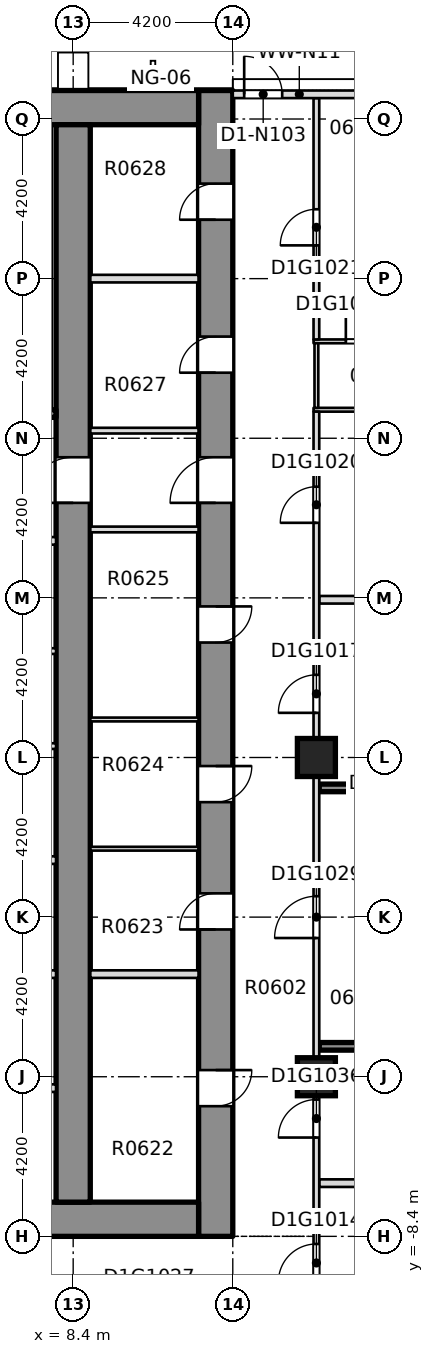
"""IFC4 building model, lengths in metres.
Left out: names, types, materials, properties, quantities, classifications, styles, units other than length and angle.
Written with IfcOpenShell. Run it as: python <this file> out.ifc"""

import sys

from ifc_helpers import new_model, si_unit, direction, frame, frame_2d, origin, origin_2d, place, context, subcontext, project, spatial, rectangle, extrude, element, fill, save


model = new_model("IFC4")
c1 = context("Model", 3, precision=1e-05, world=origin(), true_north=direction((0.0, 1.0)))
c2 = subcontext(c1, "Body", "Model", "MODEL_VIEW")
j1 = project(units=[si_unit("LENGTHUNIT", "METRE"), si_unit("PLANEANGLEUNIT", "RADIAN")], contexts=[c1])
p1 = place(None, origin())
s1 = spatial("IfcSite", under=j1, at=p1, CompositionType="ELEMENT")
p2 = place(p1, origin())
s2 = spatial("IfcBuilding", under=s1, at=p2, CompositionType="ELEMENT")
p3 = place(p2, frame((0.0, 0.0, 34.5)))
s3 = spatial("IfcBuildingStorey", under=s2, at=p3, CompositionType="ELEMENT", Elevation=34.5)
p4 = place(p3, frame((12.15, -8.4, -0.32), z_axis=(0.0, 0.0, 1.0), x_axis=(0.0, 1.0, 0.0)))
e1 = element("IfcWall", 1, at=p4, inside=s3, PredefinedType="SHEAR", context=c2, shape_type="SweptSolid", body=[
    extrude(rectangle(XDim=30.15, YDim=0.9, at=frame_2d((15.075, 0.0))), origin(), (0.0, 0.0, 1.0), 3.45),
])
p5 = place(p4, frame((3.425, 0.0, 0.32)))
e2 = element("IfcOpeningElement", 2, at=p5, cuts=e1, PredefinedType="OPENING", context=c2, shape_type="SweptSolid", body=[
    extrude(rectangle(XDim=0.95, YDim=2.1, at=frame_2d((0.475, 1.05))), frame((0.0, 0.46, 0.0), z_axis=(0.0, -1.0, 0.0), x_axis=(1.0, 0.0, 0.0)), (0.0, 0.0, 1.0), 0.92),
])
p6 = place(p4, frame((8.075, 0.0, 0.32)))
e3 = element("IfcOpeningElement", 3, at=p6, cuts=e1, PredefinedType="OPENING", context=c2, shape_type="SweptSolid", body=[
    extrude(rectangle(XDim=0.95, YDim=2.1, at=frame_2d((0.475, 1.05))), frame((0.0, 0.46, 0.0), z_axis=(0.0, -1.0, 0.0), x_axis=(1.0, 0.0, 0.0)), (0.0, 0.0, 1.0), 0.92),
])
p7 = place(p4, frame((11.425, 0.0, 0.32)))
e4 = element("IfcOpeningElement", 4, at=p7, cuts=e1, PredefinedType="OPENING", context=c2, shape_type="SweptSolid", body=[
    extrude(rectangle(XDim=0.95, YDim=2.1, at=frame_2d((0.475, 1.05))), frame((0.0, 0.46, 0.0), z_axis=(0.0, -1.0, 0.0), x_axis=(1.0, 0.0, 0.0)), (0.0, 0.0, 1.0), 0.92),
])
p8 = place(p4, frame((15.625, 0.0, 0.32)))
e5 = element("IfcOpeningElement", 5, at=p8, cuts=e1, PredefinedType="OPENING", context=c2, shape_type="SweptSolid", body=[
    extrude(rectangle(XDim=0.95, YDim=2.1, at=frame_2d((0.475, 1.05))), frame((0.0, 0.46, 0.0), z_axis=(0.0, -1.0, 0.0), x_axis=(1.0, 0.0, 0.0)), (0.0, 0.0, 1.0), 0.92),
])
p9 = place(p4, frame((22.725, 0.0, 0.32)))
e6 = element("IfcOpeningElement", 6, at=p9, cuts=e1, PredefinedType="OPENING", context=c2, shape_type="SweptSolid", body=[
    extrude(rectangle(XDim=0.95, YDim=2.1, at=frame_2d((0.475, 1.05))), frame((0.0, 0.46, 0.0), z_axis=(0.0, -1.0, 0.0), x_axis=(1.0, 0.0, 0.0)), (0.0, 0.0, 1.0), 0.92),
])
p10 = place(p4, frame((26.75, 0.0, 0.32)))
e7 = element("IfcOpeningElement", 7, at=p10, cuts=e1, PredefinedType="OPENING", context=c2, shape_type="SweptSolid", body=[
    extrude(rectangle(XDim=0.95, YDim=2.1, at=frame_2d((0.475, 1.05))), frame((0.0, 0.46, 0.0), z_axis=(0.0, -1.0, 0.0), x_axis=(1.0, 0.0, 0.0)), (0.0, 0.0, 1.0), 0.92),
])
p11 = place(p4, frame((19.3, 0.0, 0.32)))
e8 = element("IfcOpeningElement", 8, at=p11, cuts=e1, PredefinedType="OPENING", context=c2, shape_type="SweptSolid", body=[
    extrude(rectangle(XDim=1.2, YDim=2.1, at=frame_2d((0.6, 1.05))), frame((0.0, 0.46, 0.0), z_axis=(0.0, -1.0, 0.0), x_axis=(1.0, 0.0, 0.0)), (0.0, 0.0, 1.0), 0.92),
])
p12 = place(p3, frame((-11.7, -7.95, -0.32), z_axis=(0.0, 0.0, 1.0), x_axis=(1.0, 0.0, 0.0)))
e9 = element("IfcWall", 9, at=p12, inside=s3, PredefinedType="SHEAR", context=c2, shape_type="SweptSolid", body=[
    extrude(rectangle(XDim=23.4, YDim=0.9, at=frame_2d((11.7, 0.0))), origin(), (0.0, 0.0, 1.0), 3.45),
])
p13 = place(p12, frame((6.95, 0.0, 0.32)))
e10 = element("IfcOpeningElement", 10, at=p13, cuts=e9, PredefinedType="OPENING", context=c2, shape_type="SweptSolid", body=[
    extrude(rectangle(XDim=1.8, YDim=2.1, at=frame_2d((0.9, 1.05))), frame((0.0, 0.46, 0.0), z_axis=(0.0, -1.0, 0.0), x_axis=(1.0, 0.0, 0.0)), (0.0, 0.0, 1.0), 0.92),
])
p14 = place(p12, frame((14.65, 0.0, 0.32)))
e11 = element("IfcOpeningElement", 11, at=p14, cuts=e9, PredefinedType="OPENING", context=c2, shape_type="SweptSolid", body=[
    extrude(rectangle(XDim=1.8, YDim=2.1, at=frame_2d((0.9, 1.05))), frame((0.0, 0.46, 0.0), z_axis=(0.0, -1.0, 0.0), x_axis=(1.0, 0.0, 0.0)), (0.0, 0.0, 1.0), 0.92),
])
p15 = place(p3, frame((-11.7, 21.3, -0.32), z_axis=(0.0, 0.0, 1.0), x_axis=(1.0, 0.0, 0.0)))
e12 = element("IfcWall", 12, at=p15, inside=s3, PredefinedType="SOLIDWALL", context=c2, shape_type="SweptSolid", body=[
    extrude(rectangle(XDim=23.4, YDim=0.9, at=frame_2d((11.7, 0.0))), origin(), (0.0, 0.0, 1.0), 3.45),
])
p16 = place(p3, frame((8.4, -7.5, -0.32), z_axis=(0.0, 0.0, 1.0), x_axis=(0.0, 1.0, 0.0)))
e13 = element("IfcWall", 13, at=p16, inside=s3, PredefinedType="SHEAR", context=c2, shape_type="SweptSolid", body=[
    extrude(rectangle(XDim=28.35, YDim=0.9, at=frame_2d((14.175, 0.0))), origin(), (0.0, 0.0, 1.0), 3.45),
])
p17 = place(p16, frame((18.4, 0.0, 0.32)))
e14 = element("IfcOpeningElement", 14, at=p17, cuts=e13, PredefinedType="OPENING", context=c2, shape_type="SweptSolid", body=[
    extrude(rectangle(XDim=1.2, YDim=2.1, at=frame_2d((0.6, 1.05))), frame((0.0, 0.46, 0.0), z_axis=(0.0, -1.0, 0.0), x_axis=(1.0, 0.0, 0.0)), (0.0, 0.0, 1.0), 0.92),
])
for number, where, z_axis, x_axis in (
    (15, (14.8, -4.2, -0.32), (0.0, 0.0, 1.0), (1.0, 0.0, 0.0)),
    (16, (14.8, 4.2, -0.32), (0.0, 0.0, 1.0), (1.0, 0.0, 0.0)),
):
    element("IfcColumn", number, at=place(p3, frame(where, z_axis=z_axis, x_axis=x_axis)), inside=s3, PredefinedType="COLUMN", context=c2, shape_type="SweptSolid", body=[
        extrude(rectangle(XDim=1.0, YDim=1.0, at=origin_2d()), origin(), (0.0, 0.0, 1.0), 3.45),
    ])
p18 = place(p3, frame((14.875, -7.0, 0.0), z_axis=(0.0, 0.0, 1.0), x_axis=(1.0, 0.0, 0.0)))
e17 = element("IfcWall", 17, at=p18, inside=s3, PredefinedType="PARTITIONING", context=c2, shape_type="SweptSolid", body=[
    extrude(rectangle(XDim=10.875, YDim=0.2, at=frame_2d((5.438, 0.0))), origin(), (0.0, 0.0, 1.0), 3.13),
])
p19 = place(p3, frame((14.875, -3.4, 0.0), z_axis=(0.0, 0.0, 1.0), x_axis=(1.0, 0.0, 0.0)))
e18 = element("IfcWall", 18, at=p19, inside=s3, PredefinedType="SOLIDWALL", context=c2, shape_type="SweptSolid", body=[
    extrude(rectangle(XDim=5.525, YDim=0.2, at=frame_2d((2.762, 0.0))), origin(), (0.0, 0.0, 1.0), 3.13),
])
p20 = place(p3, frame((14.875, 3.4, 0.0), z_axis=(0.0, 0.0, 1.0), x_axis=(1.0, 0.0, 0.0)))
e19 = element("IfcWall", 19, at=p20, inside=s3, PredefinedType="SOLIDWALL", context=c2, shape_type="SweptSolid", body=[
    extrude(rectangle(XDim=5.575, YDim=0.2, at=frame_2d((2.788, 0.0))), origin(), (0.0, 0.0, 1.0), 3.13),
])
p21 = place(p3, frame((14.875, 8.35, 0.0), z_axis=(0.0, 0.0, 1.0), x_axis=(1.0, 0.0, 0.0)))
e20 = element("IfcWall", 20, at=p21, inside=s3, PredefinedType="PARTITIONING", context=c2, shape_type="SweptSolid", body=[
    extrude(rectangle(XDim=10.875, YDim=0.2, at=frame_2d((5.438, 0.0))), origin(), (0.0, 0.0, 1.0), 3.13),
])
p22 = place(p3, frame((14.725, 13.35, 0.0), z_axis=(0.0, 0.0, 1.0), x_axis=(1.0, 0.0, 0.0)))
e21 = element("IfcWall", 21, at=p22, inside=s3, PredefinedType="PARTITIONING", context=c2, shape_type="SweptSolid", body=[
    extrude(rectangle(XDim=2.525, YDim=0.1, at=frame_2d((1.262, 0.0))), origin(), (0.0, 0.0, 1.0), 3.13),
])
p23 = place(p3, frame((14.725, 15.15, 0.0), z_axis=(0.0, 0.0, 1.0), x_axis=(1.0, 0.0, 0.0)))
e22 = element("IfcWall", 22, at=p23, inside=s3, PredefinedType="PARTITIONING", context=c2, shape_type="SweptSolid", body=[
    extrude(rectangle(XDim=2.525, YDim=0.1, at=frame_2d((1.262, 0.0))), origin(), (0.0, 0.0, 1.0), 3.13),
])
p24 = place(p23, frame((0.85, 0.0, 0.0)))
e23 = element("IfcOpeningElement", 23, at=p24, cuts=e22, PredefinedType="OPENING", context=c2, shape_type="SweptSolid", body=[
    extrude(rectangle(XDim=0.85, YDim=2.1, at=frame_2d((0.425, 1.05))), frame((0.0, 0.06, 0.0), z_axis=(0.0, -1.0, 0.0), x_axis=(1.0, 0.0, 0.0)), (0.0, 0.0, 1.0), 0.12),
])
p25 = place(p3, frame((14.8, -10.525, 0.0), z_axis=(0.0, 0.0, 1.0), x_axis=(0.0, 1.0, 0.0)))
e24 = element("IfcWall", 24, at=p25, inside=s3, PredefinedType="PARTITIONING", context=c2, shape_type="SweptSolid", body=[
    extrude(rectangle(XDim=23.825, YDim=0.15, at=frame_2d((11.913, 0.0))), origin(), (0.0, 0.0, 1.0), 3.13),
])
p26 = place(p25, frame((0.925, 0.0, 0.0)))
e25 = element("IfcOpeningElement", 25, at=p26, cuts=e24, PredefinedType="OPENING", context=c2, shape_type="SweptSolid", body=[
    extrude(rectangle(XDim=1.0, YDim=2.1, at=frame_2d((0.5, 1.05))), frame((0.0, 0.085, 0.0), z_axis=(0.0, -1.0, 0.0), x_axis=(1.0, 0.0, 0.0)), (0.0, 0.0, 1.0), 0.17),
])
p27 = place(p25, frame((15.9, 0.0, 0.0)))
e26 = element("IfcOpeningElement", 26, at=p27, cuts=e24, PredefinedType="OPENING", context=c2, shape_type="SweptSolid", body=[
    extrude(rectangle(XDim=1.0, YDim=2.1, at=frame_2d((0.5, 1.05))), frame((0.0, 0.085, 0.0), z_axis=(0.0, -1.0, 0.0), x_axis=(1.0, 0.0, 0.0)), (0.0, 0.0, 1.0), 0.17),
])
p28 = place(p25, frame((20.9, 0.0, 0.0)))
e27 = element("IfcOpeningElement", 27, at=p28, cuts=e24, PredefinedType="OPENING", context=c2, shape_type="SweptSolid", body=[
    extrude(rectangle(XDim=0.95, YDim=2.1, at=frame_2d((0.475, 1.05))), frame((0.0, 0.085, 0.0), z_axis=(0.0, -1.0, 0.0), x_axis=(1.0, 0.0, 0.0)), (0.0, 0.0, 1.0), 0.17),
])
p29 = place(p25, frame((9.975, 0.0, 0.0)))
e28 = element("IfcOpeningElement", 28, at=p29, cuts=e24, PredefinedType="OPENING", context=c2, shape_type="SweptSolid", body=[
    extrude(rectangle(XDim=1.1, YDim=2.1, at=frame_2d((0.55, 1.05))), frame((0.0, 0.085, 0.0), z_axis=(0.0, -1.0, 0.0), x_axis=(1.0, 0.0, 0.0)), (0.0, 0.0, 1.0), 0.17),
])
p30 = place(p25, frame((4.725, 0.0, 0.0)))
e29 = element("IfcOpeningElement", 29, at=p30, cuts=e24, PredefinedType="OPENING", context=c2, shape_type="SweptSolid", body=[
    extrude(rectangle(XDim=1.0, YDim=2.1, at=frame_2d((0.5, 1.05))), frame((0.0, 0.085, 0.0), z_axis=(0.0, -1.0, 0.0), x_axis=(1.0, 0.0, 0.0)), (0.0, 0.0, 1.0), 0.17),
])
p31 = place(p3, frame((14.8, 13.4, 0.0), z_axis=(0.0, 0.0, 1.0), x_axis=(0.0, 1.0, 0.0)))
e30 = element("IfcWall", 30, at=p31, inside=s3, PredefinedType="PARTITIONING", context=c2, shape_type="SweptSolid", body=[
    extrude(rectangle(XDim=1.7, YDim=0.1, at=frame_2d((0.85, 0.0))), origin(), (0.0, 0.0, 1.0), 3.13),
])
p32 = place(p3, frame((14.8, 15.2, 0.0), z_axis=(0.0, 0.0, 1.0), x_axis=(0.0, 1.0, 0.0)))
e31 = element("IfcWall", 31, at=p32, inside=s3, PredefinedType="PARTITIONING", context=c2, shape_type="SweptSolid", body=[
    extrude(rectangle(XDim=6.35, YDim=0.15, at=frame_2d((3.175, 0.0))), origin(), (0.0, 0.0, 1.0), 3.13),
])
p33 = place(p32, frame((2.475, 0.0, 0.0)))
e32 = element("IfcOpeningElement", 32, at=p33, cuts=e31, PredefinedType="OPENING", context=c2, shape_type="SweptSolid", body=[
    extrude(rectangle(XDim=0.95, YDim=2.1, at=frame_2d((0.475, 1.05))), frame((0.0, 0.085, 0.0), z_axis=(0.0, -1.0, 0.0), x_axis=(1.0, 0.0, 0.0)), (0.0, 0.0, 1.0), 0.17),
])
p34 = place(p3, frame((16.1, 21.65, 0.0), z_axis=(0.0, 0.0, 1.0), x_axis=(-1.0, 0.0, 0.0)))
e33 = element("IfcWall", 33, at=p34, inside=s3, PredefinedType="STANDARD", context=c2, shape_type="SweptSolid", body=[
    extrude(rectangle(XDim=3.5, YDim=0.2, at=frame_2d((1.75, 0.0))), origin(), (0.0, 0.0, 1.0), 3.13),
])
p35 = place(p34, frame((2.2, 0.0, 0.0)))
e34 = element("IfcOpeningElement", 34, at=p35, cuts=e33, PredefinedType="OPENING", context=c2, shape_type="SweptSolid", body=[
    extrude(rectangle(XDim=1.0, YDim=2.4, at=frame_2d((0.5, 1.2))), frame((0.0, 0.11, 0.0), z_axis=(0.0, -1.0, 0.0), x_axis=(1.0, 0.0, 0.0)), (0.0, 0.0, 1.0), 0.22),
])
for number, where, z_axis, x_axis in (
    (35, (5.575, -4.5, 0.0), (0.0, 0.0, 1.0), (1.0, 0.0, 0.0)),
    (36, (5.575, -1.5, 0.0), (0.0, 0.0, 1.0), (1.0, 0.0, 0.0)),
    (37, (5.575, 1.5, 0.0), (0.0, 0.0, 1.0), (1.0, 0.0, 0.0)),
):
    element("IfcWall", number, at=place(p3, frame(where, z_axis=z_axis, x_axis=x_axis)), inside=s3, PredefinedType="PARTITIONING", context=c2, shape_type="SweptSolid", body=[
        extrude(rectangle(XDim=2.374, YDim=0.2, at=frame_2d((1.187, 0.0))), origin(), (0.0, 0.0, 1.0), 3.13),
    ])
p36 = place(p3, frame((5.425, 4.5, 0.0), z_axis=(0.0, 0.0, 1.0), x_axis=(1.0, 0.0, 0.0)))
e38 = element("IfcWall", 38, at=p36, inside=s3, PredefinedType="PARTITIONING", context=c2, shape_type="SweptSolid", body=[
    extrude(rectangle(XDim=2.524, YDim=0.15, at=frame_2d((1.262, 0.0))), origin(), (0.0, 0.0, 1.0), 3.13),
])
p37 = place(p3, frame((-7.949, 7.0, 0.0), z_axis=(0.0, 0.0, 1.0), x_axis=(1.0, 0.0, 0.0)))
e39 = element("IfcWall", 39, at=p37, inside=s3, PredefinedType="PARTITIONING", context=c2, shape_type="SweptSolid", body=[
    extrude(rectangle(XDim=15.898, YDim=0.15, at=frame_2d((7.949, 0.0))), origin(), (0.0, 0.0, 1.0), 3.13),
])
p38 = place(p37, frame((7.249, 0.0, 0.0)))
e40 = element("IfcOpeningElement", 40, at=p38, cuts=e39, PredefinedType="OPENING", context=c2, shape_type="SweptSolid", body=[
    extrude(rectangle(XDim=1.4, YDim=2.1, at=frame_2d((0.7, 1.05))), frame((0.0, 0.085, 0.0), z_axis=(0.0, -1.0, 0.0), x_axis=(1.0, 0.0, 0.0)), (0.0, 0.0, 1.0), 0.17),
])
p39 = place(p3, frame((3.6, 9.9, 0.0), z_axis=(0.0, 0.0, 1.0), x_axis=(1.0, 0.0, 0.0)))
e41 = element("IfcWall", 41, at=p39, inside=s3, PredefinedType="PARTITIONING", context=c2, shape_type="SweptSolid", body=[
    extrude(rectangle(XDim=4.349, YDim=0.2, at=frame_2d((2.174, 0.0))), origin(), (0.0, 0.0, 1.0), 3.13),
])
p40 = place(p39, frame((2.25, 0.0, 0.0)))
e42 = element("IfcOpeningElement", 42, at=p40, cuts=e41, PredefinedType="OPENING", context=c2, shape_type="SweptSolid", body=[
    extrude(rectangle(XDim=1.1, YDim=2.1, at=frame_2d((0.55, 1.05))), frame((0.0, 0.11, 0.0), z_axis=(0.0, -1.0, 0.0), x_axis=(1.0, 0.0, 0.0)), (0.0, 0.0, 1.0), 0.22),
])
p41 = place(p3, frame((3.425, 13.25, 0.0), z_axis=(0.0, 0.0, 1.0), x_axis=(1.0, 0.0, 0.0)))
e43 = element("IfcWall", 43, at=p41, inside=s3, PredefinedType="SOLIDWALL", context=c2, shape_type="SweptSolid", body=[
    extrude(rectangle(XDim=4.524, YDim=0.2, at=frame_2d((2.262, 0.0))), origin(), (0.0, 0.0, 1.0), 3.13),
])
p42 = place(p41, frame((1.825, 0.0, 0.0)))
e44 = element("IfcOpeningElement", 44, at=p42, cuts=e43, PredefinedType="OPENING", context=c2, shape_type="SweptSolid", body=[
    extrude(rectangle(XDim=1.2, YDim=2.1, at=frame_2d((0.6, 1.05))), frame((0.0, 0.11, 0.0), z_axis=(0.0, -1.0, 0.0), x_axis=(1.0, 0.0, 0.0)), (0.0, 0.0, 1.0), 0.22),
])
p43 = place(p3, frame((8.851, -1.5, 0.0), z_axis=(0.0, 0.0, 1.0), x_axis=(1.0, 0.0, 0.0)))
e45 = element("IfcWall", 45, at=p43, inside=s3, PredefinedType="PARTITIONING", context=c2, shape_type="SweptSolid", body=[
    extrude(rectangle(XDim=2.848, YDim=0.2, at=frame_2d((1.424, 0.0))), origin(), (0.0, 0.0, 1.0), 3.13),
])
for number, where, z_axis, x_axis in (
    (46, (8.851, 1.8, 0.0), (0.0, 0.0, 1.0), (1.0, 0.0, 0.0)),
    (47, (8.851, 5.2, 0.0), (0.0, 0.0, 1.0), (1.0, 0.0, 0.0)),
):
    element("IfcWall", number, at=place(p3, frame(where, z_axis=z_axis, x_axis=x_axis)), inside=s3, PredefinedType="PARTITIONING", context=c2, shape_type="SweptSolid", body=[
        extrude(rectangle(XDim=2.848, YDim=0.1, at=frame_2d((1.424, 0.0))), origin(), (0.0, 0.0, 1.0), 3.13),
    ])
for number, where, z_axis, x_axis in (
    (48, (8.851, 10.2, 0.0), (0.0, 0.0, 1.0), (1.0, 0.0, 0.0)),
    (49, (8.851, 12.8, 0.0), (0.0, 0.0, 1.0), (1.0, 0.0, 0.0)),
):
    element("IfcWall", number, at=place(p3, frame(where, z_axis=z_axis, x_axis=x_axis)), inside=s3, PredefinedType="PARTITIONING", context=c2, shape_type="SweptSolid", body=[
        extrude(rectangle(XDim=2.848, YDim=0.15, at=frame_2d((1.424, 0.0))), origin(), (0.0, 0.0, 1.0), 3.13),
    ])
p44 = place(p3, frame((8.851, 16.8, 0.0), z_axis=(0.0, 0.0, 1.0), x_axis=(1.0, 0.0, 0.0)))
e50 = element("IfcWall", 50, at=p44, inside=s3, PredefinedType="PARTITIONING", context=c2, shape_type="SweptSolid", body=[
    extrude(rectangle(XDim=2.848, YDim=0.2, at=frame_2d((1.424, 0.0))), origin(), (0.0, 0.0, 1.0), 3.13),
])
p45 = place(p26, origin())
e51 = element("IfcDoor", 51, at=p45, inside=s3, OperationType="SINGLE_SWING_RIGHT", PredefinedType="DOOR", context=c2, shape_type="SweptSolid", body=[
    extrude(rectangle(XDim=1.0, YDim=2.1, at=frame_2d((0.5, 1.05))), frame((0.0, 0.025, 0.0), z_axis=(0.0, -1.0, 0.0), x_axis=(1.0, 0.0, 0.0)), (0.0, 0.0, 1.0), 0.05),
])
fill(e25, e51)
p46 = place(p27, origin())
e52 = element("IfcDoor", 52, at=p46, inside=s3, OperationType="SINGLE_SWING_LEFT", PredefinedType="DOOR", context=c2, shape_type="SweptSolid", body=[
    extrude(rectangle(XDim=1.0, YDim=2.1, at=frame_2d((0.5, 1.05))), frame((0.0, 0.025, 0.0), z_axis=(0.0, -1.0, 0.0), x_axis=(1.0, 0.0, 0.0)), (0.0, 0.0, 1.0), 0.05),
])
fill(e26, e52)
p47 = place(p28, origin())
e53 = element("IfcDoor", 53, at=p47, inside=s3, OperationType="SINGLE_SWING_LEFT", PredefinedType="DOOR", context=c2, shape_type="SweptSolid", body=[
    extrude(rectangle(XDim=0.95, YDim=2.1, at=frame_2d((0.475, 1.05))), frame((0.0, 0.025, 0.0), z_axis=(0.0, -1.0, 0.0), x_axis=(1.0, 0.0, 0.0)), (0.0, 0.0, 1.0), 0.05),
])
fill(e27, e53)
p48 = place(p33, origin())
e54 = element("IfcDoor", 54, at=p48, inside=s3, OperationType="SINGLE_SWING_LEFT", PredefinedType="DOOR", context=c2, shape_type="SweptSolid", body=[
    extrude(rectangle(XDim=0.95, YDim=2.1, at=frame_2d((0.475, 1.05))), frame((0.0, 0.025, 0.0), z_axis=(0.0, -1.0, 0.0), x_axis=(1.0, 0.0, 0.0)), (0.0, 0.0, 1.0), 0.05),
])
fill(e32, e54)
p49 = place(p24, origin())
e55 = element("IfcDoor", 55, at=p49, inside=s3, OperationType="SINGLE_SWING_RIGHT", PredefinedType="DOOR", context=c2, shape_type="SweptSolid", body=[
    extrude(rectangle(XDim=0.85, YDim=2.1, at=frame_2d((0.425, 1.05))), frame((0.0, 0.025, 0.0), z_axis=(0.0, -1.0, 0.0), x_axis=(1.0, 0.0, 0.0)), (0.0, 0.0, 1.0), 0.05),
])
fill(e23, e55)
p50 = place(p29, origin())
e56 = element("IfcDoor", 56, at=p50, inside=s3, OperationType="SINGLE_SWING_LEFT", PredefinedType="DOOR", context=c2, shape_type="SweptSolid", body=[
    extrude(rectangle(XDim=1.1, YDim=2.1, at=frame_2d((0.55, 1.05))), frame((0.0, 0.025, 0.0), z_axis=(0.0, -1.0, 0.0), x_axis=(1.0, 0.0, 0.0)), (0.0, 0.0, 1.0), 0.05),
])
fill(e28, e56)
p51 = place(p30, origin())
e57 = element("IfcDoor", 57, at=p51, inside=s3, OperationType="SINGLE_SWING_RIGHT", PredefinedType="DOOR", context=c2, shape_type="SweptSolid", body=[
    extrude(rectangle(XDim=1.0, YDim=2.1, at=frame_2d((0.5, 1.05))), frame((0.0, 0.025, 0.0), z_axis=(0.0, -1.0, 0.0), x_axis=(1.0, 0.0, 0.0)), (0.0, 0.0, 1.0), 0.05),
])
fill(e29, e57)
p52 = place(p35, origin())
e58 = element("IfcDoor", 58, at=p52, inside=s3, OperationType="SINGLE_SWING_LEFT", PredefinedType="DOOR", context=c2, shape_type="SweptSolid", body=[
    extrude(rectangle(XDim=1.0, YDim=2.4, at=frame_2d((0.5, 1.2))), frame((0.0, 0.025, 0.0), z_axis=(0.0, -1.0, 0.0), x_axis=(1.0, 0.0, 0.0)), (0.0, 0.0, 1.0), 0.05),
])
fill(e34, e58)
p53 = place(p5, origin())
e59 = element("IfcDoor", 59, at=p53, inside=s3, OperationType="SINGLE_SWING_LEFT", PredefinedType="DOOR", context=c2, shape_type="SweptSolid", body=[
    extrude(rectangle(XDim=0.95, YDim=2.1, at=frame_2d((0.475, 1.05))), frame((0.0, 0.025, 0.0), z_axis=(0.0, -1.0, 0.0), x_axis=(1.0, 0.0, 0.0)), (0.0, 0.0, 1.0), 0.05),
])
fill(e2, e59)
p54 = place(p6, origin())
e60 = element("IfcDoor", 60, at=p54, inside=s3, OperationType="SINGLE_SWING_LEFT", PredefinedType="DOOR", context=c2, shape_type="SweptSolid", body=[
    extrude(rectangle(XDim=0.95, YDim=2.1, at=frame_2d((0.475, 1.05))), frame((0.0, 0.025, 0.0), z_axis=(0.0, -1.0, 0.0), x_axis=(1.0, 0.0, 0.0)), (0.0, 0.0, 1.0), 0.05),
])
fill(e3, e60)
p55 = place(p7, origin())
e61 = element("IfcDoor", 61, at=p55, inside=s3, OperationType="SINGLE_SWING_LEFT", PredefinedType="DOOR", context=c2, shape_type="SweptSolid", body=[
    extrude(rectangle(XDim=0.95, YDim=2.1, at=frame_2d((0.475, 1.05))), frame((0.0, 0.025, 0.0), z_axis=(0.0, -1.0, 0.0), x_axis=(1.0, 0.0, 0.0)), (0.0, 0.0, 1.0), 0.05),
])
fill(e4, e61)
p56 = place(p8, origin())
e62 = element("IfcDoor", 62, at=p56, inside=s3, OperationType="SINGLE_SWING_LEFT", PredefinedType="DOOR", context=c2, shape_type="SweptSolid", body=[
    extrude(rectangle(XDim=0.95, YDim=2.1, at=frame_2d((0.475, 1.05))), frame((0.0, 0.025, 0.0), z_axis=(0.0, -1.0, 0.0), x_axis=(1.0, 0.0, 0.0)), (0.0, 0.0, 1.0), 0.05),
])
fill(e5, e62)
p57 = place(p9, origin())
e63 = element("IfcDoor", 63, at=p57, inside=s3, OperationType="SINGLE_SWING_LEFT", PredefinedType="DOOR", context=c2, shape_type="SweptSolid", body=[
    extrude(rectangle(XDim=0.95, YDim=2.1, at=frame_2d((0.475, 1.05))), frame((0.0, 0.025, 0.0), z_axis=(0.0, -1.0, 0.0), x_axis=(1.0, 0.0, 0.0)), (0.0, 0.0, 1.0), 0.05),
])
fill(e6, e63)
p58 = place(p10, origin())
e64 = element("IfcDoor", 64, at=p58, inside=s3, OperationType="SINGLE_SWING_LEFT", PredefinedType="DOOR", context=c2, shape_type="SweptSolid", body=[
    extrude(rectangle(XDim=0.95, YDim=2.1, at=frame_2d((0.475, 1.05))), frame((0.0, 0.025, 0.0), z_axis=(0.0, -1.0, 0.0), x_axis=(1.0, 0.0, 0.0)), (0.0, 0.0, 1.0), 0.05),
])
fill(e7, e64)
p59 = place(p11, origin())
e65 = element("IfcDoor", 65, at=p59, inside=s3, OperationType="SINGLE_SWING_LEFT", PredefinedType="DOOR", context=c2, shape_type="SweptSolid", body=[
    extrude(rectangle(XDim=1.2, YDim=2.1, at=frame_2d((0.6, 1.05))), frame((0.0, 0.025, 0.0), z_axis=(0.0, -1.0, 0.0), x_axis=(1.0, 0.0, 0.0)), (0.0, 0.0, 1.0), 0.05),
])
fill(e8, e65)
p60 = place(p17, origin())
e66 = element("IfcDoor", 66, at=p60, inside=s3, OperationType="SINGLE_SWING_LEFT", PredefinedType="DOOR", context=c2, shape_type="SweptSolid", body=[
    extrude(rectangle(XDim=1.2, YDim=2.1, at=frame_2d((0.6, 1.05))), frame((0.0, 0.025, 0.0), z_axis=(0.0, -1.0, 0.0), x_axis=(1.0, 0.0, 0.0)), (0.0, 0.0, 1.0), 0.05),
])
fill(e14, e66)
save(model, sys.argv[1])
